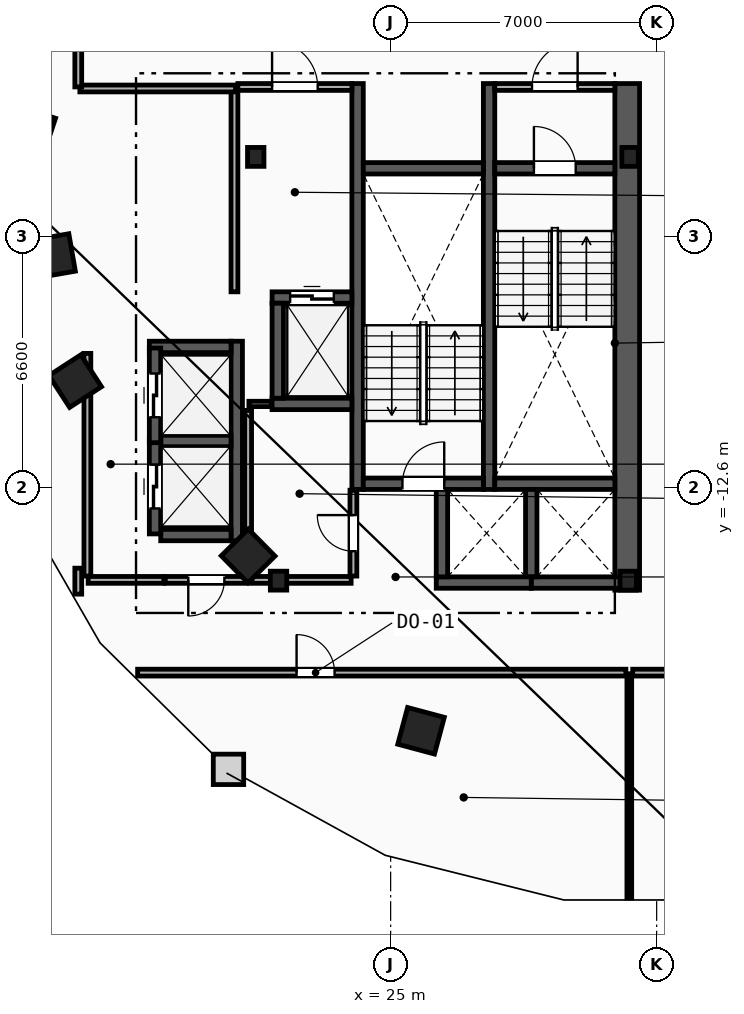
"""IFC4 building model, lengths in metres.
Left out: names, types, materials, properties, quantities, classifications, styles, units other than length and angle.
Written with IfcOpenShell. Run it as: python <this file> out.ifc"""

import sys

from ifc_helpers import new_model, si_unit, direction, frame, frame_2d, origin, origin_2d, place, context, subcontext, project, spatial, rectangle, i_section, extrude, element, fill, save


model = new_model("IFC4")
c1 = context("Model", 3, precision=1e-05, world=origin(), true_north=direction((0.0, 1.0)))
c2 = subcontext(c1, "Body", "Model", "MODEL_VIEW")
j1 = project(units=[si_unit("LENGTHUNIT", "METRE"), si_unit("PLANEANGLEUNIT", "RADIAN")], contexts=[c1])
p1 = place(None, origin())
s1 = spatial("IfcSite", under=j1, at=p1, CompositionType="ELEMENT")
p2 = place(p1, origin())
s2 = spatial("IfcBuilding", under=s1, at=p2, CompositionType="ELEMENT")
p3 = place(p2, frame((0.0, 0.0, 165.6)))
s3 = spatial("IfcBuildingStorey", under=s2, at=p3, CompositionType="ELEMENT", Elevation=165.6)
for number, where, z_axis, x_axis in (
    (1, (31.3, -3.9, 0.0), (0.0, 0.0, 1.0), (1.0, 0.0, 0.0)),
    (2, (21.45, -3.9, 0.0), (0.0, 0.0, 1.0), (1.0, 0.0, 0.0)),
    (3, (22.05, -15.05, 0.0), (0.0, 0.0, 1.0), (1.0, 0.0, 0.0)),
    (4, (31.25, -15.05, 0.0), (0.0, 0.0, 1.0), (1.0, 0.0, 0.0)),
):
    element("IfcColumn", number, at=place(p3, frame(where, z_axis=z_axis, x_axis=x_axis)), inside=s3, PredefinedType="COLUMN", context=c2, shape_type="SweptSolid", body=[
        extrude(i_section(OverallWidth=0.432, OverallDepth=0.498, WebThickness=0.056, FlangeThickness=0.089, FilletRadius=0.018, at=origin_2d()), origin(), (0.0, 0.0, 1.0), 3.6),
    ])
for number, where, z_axis, x_axis in (
    (5, (15.55, -3.2, 0.0), (0.0, 0.0, 1.0), (-0.315, -0.949, 0.0)),
    (6, (16.125, -6.5, 0.0), (0.0, 0.0, 1.0), (0.172, -0.985, 0.0)),
    (7, (16.7, -9.8, 0.0), (0.0, 0.0, 1.0), (0.544, -0.839, 0.0)),
    (8, (21.25, -14.4, 0.0), (0.0, 0.0, 1.0), (0.703, -0.711, 0.0)),
    (9, (25.8, -19.0, 0.0), (0.0, 0.0, 1.0), (0.966, -0.259, 0.0)),
):
    element("IfcColumn", number, at=place(p3, frame(where, z_axis=z_axis, x_axis=x_axis)), inside=s3, PredefinedType="COLUMN", context=c2, shape_type="SweptSolid", body=[
        extrude(rectangle(XDim=1.0, YDim=1.0, at=origin_2d()), origin(), (0.0, 0.0, 1.0), 3.6),
    ])
p4 = place(p3, frame((31.225, -15.3, 0.0), z_axis=(0.0, 0.0, 1.0), x_axis=(0.0, 1.0, 0.0)))
e10 = element("IfcWall", 10, at=p4, inside=s3, PredefinedType="SHEAR", context=c2, shape_type="SweptSolid", body=[
    extrude(rectangle(XDim=13.33, YDim=0.65, at=frame_2d((6.665, 0.0))), origin(), (0.0, 0.0, 1.0), 3.36),
])
for number, where, z_axis, x_axis in (
    (11, (27.59, -12.65, 0.0), (0.0, 0.0, 1.0), (0.0, 1.0, 0.0)),
    (12, (24.13, -12.65, 0.0), (0.0, 0.0, 1.0), (0.0, 1.0, 0.0)),
):
    element("IfcWall", number, at=place(p3, frame(where, z_axis=z_axis, x_axis=x_axis)), inside=s3, PredefinedType="SHEAR", context=c2, shape_type="SweptSolid", body=[
        extrude(rectangle(XDim=10.68, YDim=0.3, at=frame_2d((5.34, 0.0))), origin(), (0.0, 0.0, 1.0), 3.36),
    ])
p5 = place(p3, frame((27.74, -4.2, 0.0), z_axis=(0.0, 0.0, 1.0), x_axis=(1.0, 0.0, 0.0)))
e13 = element("IfcWall", 13, at=p5, inside=s3, PredefinedType="SHEAR", context=c2, shape_type="SweptSolid", body=[
    extrude(rectangle(XDim=3.16, YDim=0.3, at=frame_2d((1.58, 0.0))), origin(), (0.0, 0.0, 1.0), 3.36),
])
p6 = place(p5, frame((1.03, 0.0, 0.0)))
e14 = element("IfcOpeningElement", 14, at=p6, cuts=e13, PredefinedType="OPENING", context=c2, shape_type="SweptSolid", body=[
    extrude(rectangle(XDim=1.1, YDim=2.15, at=frame_2d((0.55, 1.075))), frame((0.0, 0.16, 0.0), z_axis=(0.0, -1.0, 0.0), x_axis=(1.0, 0.0, 0.0)), (0.0, 0.0, 1.0), 0.32),
])
p7 = place(p3, frame((27.74, -12.5, 0.0), z_axis=(0.0, 0.0, 1.0), x_axis=(1.0, 0.0, 0.0)))
e15 = element("IfcWall", 15, at=p7, inside=s3, PredefinedType="SHEAR", context=c2, shape_type="SweptSolid", body=[
    extrude(rectangle(XDim=3.16, YDim=0.3, at=frame_2d((1.58, 0.0))), origin(), (0.0, 0.0, 1.0), 3.36),
])
p8 = place(p3, frame((24.28, -12.5, 0.0), z_axis=(0.0, 0.0, 1.0), x_axis=(1.0, 0.0, 0.0)))
e16 = element("IfcWall", 16, at=p8, inside=s3, PredefinedType="SHEAR", context=c2, shape_type="SweptSolid", body=[
    extrude(rectangle(XDim=3.16, YDim=0.3, at=frame_2d((1.58, 0.0))), origin(), (0.0, 0.0, 1.0), 3.36),
])
p9 = place(p8, frame((1.03, 0.0, 0.0)))
e17 = element("IfcOpeningElement", 17, at=p9, cuts=e16, PredefinedType="OPENING", context=c2, shape_type="SweptSolid", body=[
    extrude(rectangle(XDim=1.1, YDim=2.15, at=frame_2d((0.55, 1.075))), frame((0.0, 0.16, 0.0), z_axis=(0.0, -1.0, 0.0), x_axis=(1.0, 0.0, 0.0)), (0.0, 0.0, 1.0), 0.32),
])
p10 = place(p3, frame((24.28, -4.2, 0.0), z_axis=(0.0, 0.0, 1.0), x_axis=(1.0, 0.0, 0.0)))
e18 = element("IfcWall", 18, at=p10, inside=s3, PredefinedType="SHEAR", context=c2, shape_type="SweptSolid", body=[
    extrude(rectangle(XDim=3.16, YDim=0.3, at=frame_2d((1.58, 0.0))), origin(), (0.0, 0.0, 1.0), 3.36),
])
p11 = place(p3, frame((20.89, -7.45, 0.0), z_axis=(0.0, 0.0, 1.0), x_axis=(0.0, 1.0, 0.0)))
e19 = element("IfcWall", 19, at=p11, inside=s3, PredefinedType="PARTITIONING", context=c2, shape_type="SweptSolid", body=[
    extrude(rectangle(XDim=5.3, YDim=0.18, at=frame_2d((2.65, 0.0))), origin(), (0.0, 0.0, 1.0), 3.36),
])
p12 = place(p3, frame((20.98, -2.06, 0.0), z_axis=(0.0, 0.0, 1.0), x_axis=(1.0, 0.0, 0.0)))
e20 = element("IfcWall", 20, at=p12, inside=s3, PredefinedType="PARTITIONING", context=c2, shape_type="SweptSolid", body=[
    extrude(rectangle(XDim=3.0, YDim=0.18, at=frame_2d((1.5, 0.0))), origin(), (0.0, 0.0, 1.0), 3.36),
])
p13 = place(p12, frame((0.9, 0.0, 0.0)))
e21 = element("IfcOpeningElement", 21, at=p13, cuts=e20, PredefinedType="OPENING", context=c2, shape_type="SweptSolid", body=[
    extrude(rectangle(XDim=1.2, YDim=2.15, at=frame_2d((0.6, 1.075))), frame((0.0, 0.1, 0.0), z_axis=(0.0, -1.0, 0.0), x_axis=(1.0, 0.0, 0.0)), (0.0, 0.0, 1.0), 0.2),
])
p14 = place(p3, frame((27.74, -2.06, 0.0), z_axis=(0.0, 0.0, 1.0), x_axis=(1.0, 0.0, 0.0)))
e22 = element("IfcWall", 22, at=p14, inside=s3, PredefinedType="PARTITIONING", context=c2, shape_type="SweptSolid", body=[
    extrude(rectangle(XDim=3.16, YDim=0.18, at=frame_2d((1.58, 0.0))), origin(), (0.0, 0.0, 1.0), 3.36),
])
p15 = place(p14, frame((0.98, 0.0, 0.0)))
e23 = element("IfcOpeningElement", 23, at=p15, cuts=e22, PredefinedType="OPENING", context=c2, shape_type="SweptSolid", body=[
    extrude(rectangle(XDim=1.2, YDim=2.15, at=frame_2d((0.6, 1.075))), frame((0.0, 0.1, 0.0), z_axis=(0.0, -1.0, 0.0), x_axis=(1.0, 0.0, 0.0)), (0.0, 0.0, 1.0), 0.2),
])
p16 = place(p3, frame((21.88, -7.6, 0.0), z_axis=(0.0, 0.0, 1.0), x_axis=(1.0, 0.0, 0.0)))
e24 = element("IfcWall", 24, at=p16, inside=s3, PredefinedType="SHEAR", context=c2, shape_type="SweptSolid", body=[
    extrude(rectangle(XDim=2.1, YDim=0.3, at=frame_2d((1.05, 0.0))), origin(), (0.0, 0.0, 1.0), 3.36),
])
p17 = place(p16, frame((0.475, 0.0, 0.0)))
e25 = element("IfcOpeningElement", 25, at=p17, cuts=e24, PredefinedType="OPENING", context=c2, shape_type="SweptSolid", body=[
    extrude(rectangle(XDim=1.15, YDim=2.2, at=frame_2d((0.575, 1.1))), frame((0.0, 0.16, 0.0), z_axis=(0.0, -1.0, 0.0), x_axis=(1.0, 0.0, 0.0)), (0.0, 0.0, 1.0), 0.32),
])
p18 = place(p3, frame((21.88, -10.4, 0.0), z_axis=(0.0, 0.0, 1.0), x_axis=(1.0, 0.0, 0.0)))
e26 = element("IfcWall", 26, at=p18, inside=s3, PredefinedType="SHEAR", context=c2, shape_type="SweptSolid", body=[
    extrude(rectangle(XDim=2.1, YDim=0.3, at=frame_2d((1.05, 0.0))), origin(), (0.0, 0.0, 1.0), 3.36),
])
for number, where, z_axis, x_axis in (
    (27, (22.03, -10.25, 0.0), (0.0, 0.0, 1.0), (0.0, 1.0, 0.0)),
    (28, (28.7, -15.1, 0.0), (0.0, 0.0, 1.0), (1.0, 0.0, 0.0)),
):
    element("IfcWall", number, at=place(p3, frame(where, z_axis=z_axis, x_axis=x_axis)), inside=s3, PredefinedType="SHEAR", context=c2, shape_type="SweptSolid", body=[
        extrude(rectangle(XDim=2.5, YDim=0.3, at=frame_2d((1.25, 0.0))), origin(), (0.0, 0.0, 1.0), 3.36),
    ])
p19 = place(p3, frame((28.7, -14.95, 0.0), z_axis=(0.0, 0.0, 1.0), x_axis=(0.0, 1.0, 0.0)))
e29 = element("IfcWall", 29, at=p19, inside=s3, PredefinedType="SHEAR", context=c2, shape_type="SweptSolid", body=[
    extrude(rectangle(XDim=2.3, YDim=0.3, at=frame_2d((1.15, 0.0))), origin(), (0.0, 0.0, 1.0), 3.36),
])
p20 = place(p3, frame((26.2, -15.1, 0.0), z_axis=(0.0, 0.0, 1.0), x_axis=(1.0, 0.0, 0.0)))
e30 = element("IfcWall", 30, at=p20, inside=s3, PredefinedType="SHEAR", context=c2, shape_type="SweptSolid", body=[
    extrude(rectangle(XDim=2.5, YDim=0.3, at=frame_2d((1.25, 0.0))), origin(), (0.0, 0.0, 1.0), 3.36),
])
p21 = place(p3, frame((26.35, -14.95, 0.0), z_axis=(0.0, 0.0, 1.0), x_axis=(0.0, 1.0, 0.0)))
e31 = element("IfcWall", 31, at=p21, inside=s3, PredefinedType="SHEAR", context=c2, shape_type="SweptSolid", body=[
    extrude(rectangle(XDim=2.3, YDim=0.3, at=frame_2d((1.15, 0.0))), origin(), (0.0, 0.0, 1.0), 3.36),
])
p22 = place(p3, frame((20.95, -14.0, 0.0), z_axis=(0.0, 0.0, 1.0), x_axis=(0.0, 1.0, 0.0)))
e32 = element("IfcWall", 32, at=p22, inside=s3, PredefinedType="SHEAR", context=c2, shape_type="SweptSolid", body=[
    extrude(rectangle(XDim=5.25, YDim=0.3, at=frame_2d((2.625, 0.0))), origin(), (0.0, 0.0, 1.0), 3.36),
])
p23 = place(p3, frame((18.95, -13.85, 0.0), z_axis=(0.0, 0.0, 1.0), x_axis=(1.0, 0.0, 0.0)))
e33 = element("IfcWall", 33, at=p23, inside=s3, PredefinedType="SHEAR", context=c2, shape_type="SweptSolid", body=[
    extrude(rectangle(XDim=1.85, YDim=0.3, at=frame_2d((0.925, 0.0))), origin(), (0.0, 0.0, 1.0), 3.36),
])
p24 = place(p3, frame((18.65, -8.9, 0.0), z_axis=(0.0, 0.0, 1.0), x_axis=(1.0, 0.0, 0.0)))
e34 = element("IfcWall", 34, at=p24, inside=s3, PredefinedType="SHEAR", context=c2, shape_type="SweptSolid", body=[
    extrude(rectangle(XDim=2.15, YDim=0.3, at=frame_2d((1.075, 0.0))), origin(), (0.0, 0.0, 1.0), 3.36),
])
p25 = place(p3, frame((18.95, -11.375, 0.0), z_axis=(0.0, 0.0, 1.0), x_axis=(1.0, 0.0, 0.0)))
e35 = element("IfcWall", 35, at=p25, inside=s3, PredefinedType="SHEAR", context=c2, shape_type="SweptSolid", body=[
    extrude(rectangle(XDim=1.85, YDim=0.3, at=frame_2d((0.925, 0.0))), origin(), (0.0, 0.0, 1.0), 3.36),
])
p26 = place(p3, frame((18.8, -13.82, 0.0), z_axis=(0.0, 0.0, 1.0), x_axis=(0.0, 1.0, 0.0)))
e36 = element("IfcWall", 36, at=p26, inside=s3, PredefinedType="SHEAR", context=c2, shape_type="SweptSolid", body=[
    extrude(rectangle(XDim=2.49, YDim=0.3, at=frame_2d((1.245, 0.0))), origin(), (0.0, 0.0, 1.0), 3.36),
])
p27 = place(p26, frame((0.67, 0.0, 0.0)))
e37 = element("IfcOpeningElement", 37, at=p27, cuts=e36, PredefinedType="OPENING", context=c2, shape_type="SweptSolid", body=[
    extrude(rectangle(XDim=1.15, YDim=2.2, at=frame_2d((0.575, 1.1))), frame((0.0, 0.16, 0.0), z_axis=(0.0, -1.0, 0.0), x_axis=(1.0, 0.0, 0.0)), (0.0, 0.0, 1.0), 0.32),
])
p28 = place(p3, frame((18.8, -11.42, 0.0), z_axis=(0.0, 0.0, 1.0), x_axis=(0.0, 1.0, 0.0)))
e38 = element("IfcWall", 38, at=p28, inside=s3, PredefinedType="SHEAR", context=c2, shape_type="SweptSolid", body=[
    extrude(rectangle(XDim=2.49, YDim=0.3, at=frame_2d((1.245, 0.0))), origin(), (0.0, 0.0, 1.0), 3.36),
])
p29 = place(p28, frame((0.67, 0.0, 0.0)))
e39 = element("IfcOpeningElement", 39, at=p29, cuts=e38, PredefinedType="OPENING", context=c2, shape_type="SweptSolid", body=[
    extrude(rectangle(XDim=1.15, YDim=2.2, at=frame_2d((0.575, 1.1))), frame((0.0, 0.16, 0.0), z_axis=(0.0, -1.0, 0.0), x_axis=(1.0, 0.0, 0.0)), (0.0, 0.0, 1.0), 0.32),
])
p30 = place(p3, frame((17.02, -14.93, 0.0), z_axis=(0.0, 0.0, 1.0), x_axis=(0.0, 1.0, 0.0)))
e40 = element("IfcWall", 40, at=p30, inside=s3, PredefinedType="PARTITIONING", context=c2, shape_type="SweptSolid", body=[
    extrude(rectangle(XDim=5.86, YDim=0.18, at=frame_2d((2.93, 0.0))), origin(), (0.0, 0.0, 1.0), 3.36),
])
p31 = place(p3, frame((17.04, -15.03, 0.0), z_axis=(0.0, 0.0, 1.0), x_axis=(1.0, 0.0, 0.0)))
e41 = element("IfcWall", 41, at=p31, inside=s3, PredefinedType="PARTITIONING", context=c2, shape_type="SweptSolid", body=[
    extrude(rectangle(XDim=1.99, YDim=0.18, at=frame_2d((0.995, 0.0))), origin(), (0.0, 0.0, 1.0), 3.36),
])
p32 = place(p3, frame((21.23, -15.03, 0.0), z_axis=(0.0, 0.0, 1.0), x_axis=(-1.0, 0.0, 0.0)))
e42 = element("IfcWall", 42, at=p32, inside=s3, PredefinedType="PARTITIONING", context=c2, shape_type="SweptSolid", body=[
    extrude(rectangle(XDim=2.16, YDim=0.18, at=frame_2d((1.08, 0.0))), origin(), (0.0, 0.0, 1.0), 3.36),
])
p33 = place(p32, frame((0.605, 0.0, 0.0)))
e43 = element("IfcOpeningElement", 43, at=p33, cuts=e42, PredefinedType="OPENING", context=c2, shape_type="SweptSolid", body=[
    extrude(rectangle(XDim=0.95, YDim=2.1, at=frame_2d((0.475, 1.05))), frame((0.0, 0.1, 0.0), z_axis=(0.0, -1.0, 0.0), x_axis=(1.0, 0.0, 0.0)), (0.0, 0.0, 1.0), 0.2),
])
p34 = place(p3, frame((21.27, -10.4, 0.0), z_axis=(0.0, 0.0, 1.0), x_axis=(1.0, 0.0, 0.0)))
e44 = element("IfcWall", 44, at=p34, inside=s3, PredefinedType="PARTITIONING", context=c2, shape_type="SweptSolid", body=[
    extrude(rectangle(XDim=0.59, YDim=0.14, at=frame_2d((0.295, 0.0))), origin(), (0.0, 0.0, 1.0), 3.36),
])
p35 = place(p3, frame((21.25, -14.93, 0.0), z_axis=(0.0, 0.0, 1.0), x_axis=(0.0, 1.0, 0.0)))
e45 = element("IfcWall", 45, at=p35, inside=s3, PredefinedType="PARTITIONING", context=c2, shape_type="SweptSolid", body=[
    extrude(rectangle(XDim=4.36, YDim=0.18, at=frame_2d((2.18, 0.0))), origin(), (0.0, 0.0, 1.0), 3.36),
])
p36 = place(p3, frame((21.35, -15.03, 0.0), z_axis=(0.0, 0.0, 1.0), x_axis=(1.0, 0.0, 0.0)))
e46 = element("IfcWall", 46, at=p36, inside=s3, PredefinedType="PARTITIONING", context=c2, shape_type="SweptSolid", body=[
    extrude(rectangle(XDim=2.61, YDim=0.18, at=frame_2d((1.305, 0.0))), origin(), (0.0, 0.0, 1.0), 2.433),
])
p37 = place(p3, frame((24.02, -14.93, 0.0), z_axis=(0.0, 0.0, 1.0), x_axis=(0.0, 1.0, 0.0)))
e47 = element("IfcWall", 47, at=p37, inside=s3, PredefinedType="PARTITIONING", context=c2, shape_type="SweptSolid", body=[
    extrude(rectangle(XDim=2.26, YDim=0.18, at=frame_2d((1.13, 0.0))), origin(), (0.0, 0.0, 1.0), 3.36),
])
p38 = place(p37, frame((0.655, 0.0, 0.0)))
e48 = element("IfcOpeningElement", 48, at=p38, cuts=e47, PredefinedType="OPENING", context=c2, shape_type="SweptSolid", body=[
    extrude(rectangle(XDim=0.95, YDim=2.1, at=frame_2d((0.475, 1.05))), frame((0.0, 0.1, 0.0), z_axis=(0.0, -1.0, 0.0), x_axis=(1.0, 0.0, 0.0)), (0.0, 0.0, 1.0), 0.2),
])
p39 = place(p3, frame((31.28, -23.402, 0.0), z_axis=(0.0, 0.0, 1.0), x_axis=(0.0, 1.0, 0.0)))
e49 = element("IfcWall", 49, at=p39, inside=s3, PredefinedType="PARTITIONING", context=c2, shape_type="SweptSolid", body=[
    extrude(rectangle(XDim=5.902, YDim=0.125, at=frame_2d((2.951, 0.0))), origin(), (0.0, 0.0, 1.0), 3.36),
])
p40 = place(p3, frame((18.342, -17.47, 0.0), z_axis=(0.0, 0.0, 1.0), x_axis=(1.0, 0.0, 0.0)))
e50 = element("IfcWall", 50, at=p40, inside=s3, PredefinedType="PARTITIONING", context=c2, shape_type="SweptSolid", body=[
    extrude(rectangle(XDim=12.848, YDim=0.18, at=frame_2d((6.424, 0.0))), origin(), (0.0, 0.0, 1.0), 3.36),
])
p41 = place(p40, frame((4.183, 0.0, 0.0)))
e51 = element("IfcOpeningElement", 51, at=p41, cuts=e50, PredefinedType="OPENING", context=c2, shape_type="SweptSolid", body=[
    extrude(rectangle(XDim=1.0, YDim=2.15, at=frame_2d((0.5, 1.075))), frame((0.0, 0.1, 0.0), z_axis=(0.0, -1.0, 0.0), x_axis=(1.0, 0.0, 0.0)), (0.0, 0.0, 1.0), 0.2),
])
p42 = place(p3, frame((31.37, -17.47, 0.0), z_axis=(0.0, 0.0, 1.0), x_axis=(1.0, 0.0, 0.0)))
e52 = element("IfcWall", 52, at=p42, inside=s3, PredefinedType="PARTITIONING", context=c2, shape_type="SweptSolid", body=[
    extrude(rectangle(XDim=2.258, YDim=0.18, at=frame_2d((1.129, 0.0))), origin(), (0.0, 0.0, 1.0), 3.36),
])
p43 = place(p3, frame((16.822, -2.1, 0.0), z_axis=(0.0, 0.0, 1.0), x_axis=(1.0, 0.0, 0.0)))
e53 = element("IfcWall", 53, at=p43, inside=s3, PredefinedType="PARTITIONING", context=c2, shape_type="SweptSolid", body=[
    extrude(rectangle(XDim=4.098, YDim=0.18, at=frame_2d((2.049, 0.0))), origin(), (0.0, 0.0, 1.0), 3.36),
])
p44 = place(p3, frame((16.78, 0.329, 0.0), z_axis=(0.0, 0.0, 1.0), x_axis=(0.0, -1.0, 0.0)))
e54 = element("IfcWall", 54, at=p44, inside=s3, PredefinedType="PARTITIONING", context=c2, shape_type="SweptSolid", body=[
    extrude(rectangle(XDim=2.387, YDim=0.18, at=frame_2d((1.194, 0.0))), origin(), (0.0, 0.0, 1.0), 3.36),
])
p45 = place(p3, frame((16.78, -14.721, 0.0), z_axis=(0.0, 0.0, 1.0), x_axis=(0.0, -1.0, 0.0)))
e55 = element("IfcWall", 55, at=p45, inside=s3, PredefinedType="PARTITIONING", context=c2, shape_type="SweptSolid", body=[
    extrude(rectangle(XDim=0.684, YDim=0.18, at=frame_2d((0.342, 0.0))), origin(), (0.0, 0.0, 1.0), 3.36),
])
p46 = place(p6, origin())
e56 = element("IfcDoor", 56, at=p46, inside=s3, OperationType="SINGLE_SWING_LEFT", PredefinedType="DOOR", context=c2, shape_type="SweptSolid", body=[
    extrude(rectangle(XDim=1.1, YDim=2.15, at=frame_2d((0.55, 1.075))), frame((0.0, 0.025, 0.0), z_axis=(0.0, -1.0, 0.0), x_axis=(1.0, 0.0, 0.0)), (0.0, 0.0, 1.0), 0.05),
])
fill(e14, e56)
p47 = place(p9, origin())
e57 = element("IfcDoor", 57, at=p47, inside=s3, OperationType="SINGLE_SWING_RIGHT", PredefinedType="DOOR", context=c2, shape_type="SweptSolid", body=[
    extrude(rectangle(XDim=1.1, YDim=2.15, at=frame_2d((0.55, 1.075))), frame((0.0, 0.025, 0.0), z_axis=(0.0, -1.0, 0.0), x_axis=(1.0, 0.0, 0.0)), (0.0, 0.0, 1.0), 0.05),
])
fill(e17, e57)
p48 = place(p13, origin())
e58 = element("IfcDoor", 58, at=p48, inside=s3, OperationType="SINGLE_SWING_LEFT", PredefinedType="DOOR", context=c2, shape_type="SweptSolid", body=[
    extrude(rectangle(XDim=1.2, YDim=2.15, at=frame_2d((0.6, 1.075))), frame((0.0, 0.025, 0.0), z_axis=(0.0, -1.0, 0.0), x_axis=(1.0, 0.0, 0.0)), (0.0, 0.0, 1.0), 0.05),
])
fill(e21, e58)
p49 = place(p15, origin())
e59 = element("IfcDoor", 59, at=p49, inside=s3, OperationType="SINGLE_SWING_RIGHT", PredefinedType="DOOR", context=c2, shape_type="SweptSolid", body=[
    extrude(rectangle(XDim=1.2, YDim=2.15, at=frame_2d((0.6, 1.075))), frame((0.0, 0.025, 0.0), z_axis=(0.0, -1.0, 0.0), x_axis=(1.0, 0.0, 0.0)), (0.0, 0.0, 1.0), 0.05),
])
fill(e23, e59)
p50 = place(p17, origin())
e60 = element("IfcDoor", 60, at=p50, inside=s3, OperationType="SLIDING_TO_LEFT", PredefinedType="TRAPDOOR", context=c2, shape_type="SweptSolid", body=[
    extrude(rectangle(XDim=1.15, YDim=2.2, at=frame_2d((0.575, 1.1))), frame((0.0, 0.025, 0.0), z_axis=(0.0, -1.0, 0.0), x_axis=(1.0, 0.0, 0.0)), (0.0, 0.0, 1.0), 0.05),
])
fill(e25, e60)
p51 = place(p27, origin())
e61 = element("IfcDoor", 61, at=p51, inside=s3, OperationType="SLIDING_TO_LEFT", PredefinedType="TRAPDOOR", context=c2, shape_type="SweptSolid", body=[
    extrude(rectangle(XDim=1.15, YDim=2.2, at=frame_2d((0.575, 1.1))), frame((0.0, 0.025, 0.0), z_axis=(0.0, -1.0, 0.0), x_axis=(1.0, 0.0, 0.0)), (0.0, 0.0, 1.0), 0.05),
])
fill(e37, e61)
p52 = place(p29, origin())
e62 = element("IfcDoor", 62, at=p52, inside=s3, OperationType="SLIDING_TO_LEFT", PredefinedType="TRAPDOOR", context=c2, shape_type="SweptSolid", body=[
    extrude(rectangle(XDim=1.15, YDim=2.2, at=frame_2d((0.575, 1.1))), frame((0.0, 0.025, 0.0), z_axis=(0.0, -1.0, 0.0), x_axis=(1.0, 0.0, 0.0)), (0.0, 0.0, 1.0), 0.05),
])
fill(e39, e62)
p53 = place(p41, origin())
e63 = element("IfcDoor", 63, at=p53, inside=s3, OperationType="SINGLE_SWING_LEFT", PredefinedType="DOOR", context=c2, shape_type="SweptSolid", body=[
    extrude(rectangle(XDim=1.0, YDim=2.15, at=frame_2d((0.5, 1.075))), frame((0.0, 0.025, 0.0), z_axis=(0.0, -1.0, 0.0), x_axis=(1.0, 0.0, 0.0)), (0.0, 0.0, 1.0), 0.05),
])
fill(e51, e63)
p54 = place(p38, origin())
e64 = element("IfcDoor", 64, at=p54, inside=s3, OperationType="SINGLE_SWING_RIGHT", PredefinedType="DOOR", context=c2, shape_type="SweptSolid", body=[
    extrude(rectangle(XDim=0.95, YDim=2.1, at=frame_2d((0.475, 1.05))), frame((0.0, 0.025, 0.0), z_axis=(0.0, -1.0, 0.0), x_axis=(1.0, 0.0, 0.0)), (0.0, 0.0, 1.0), 0.05),
])
fill(e48, e64)
p55 = place(p33, origin())
e65 = element("IfcDoor", 65, at=p55, inside=s3, OperationType="SINGLE_SWING_RIGHT", PredefinedType="DOOR", context=c2, shape_type="SweptSolid", body=[
    extrude(rectangle(XDim=0.95, YDim=2.1, at=frame_2d((0.475, 1.05))), frame((0.0, 0.025, 0.0), z_axis=(0.0, -1.0, 0.0), x_axis=(1.0, 0.0, 0.0)), (0.0, 0.0, 1.0), 0.05),
])
fill(e43, e65)
save(model, sys.argv[1])
